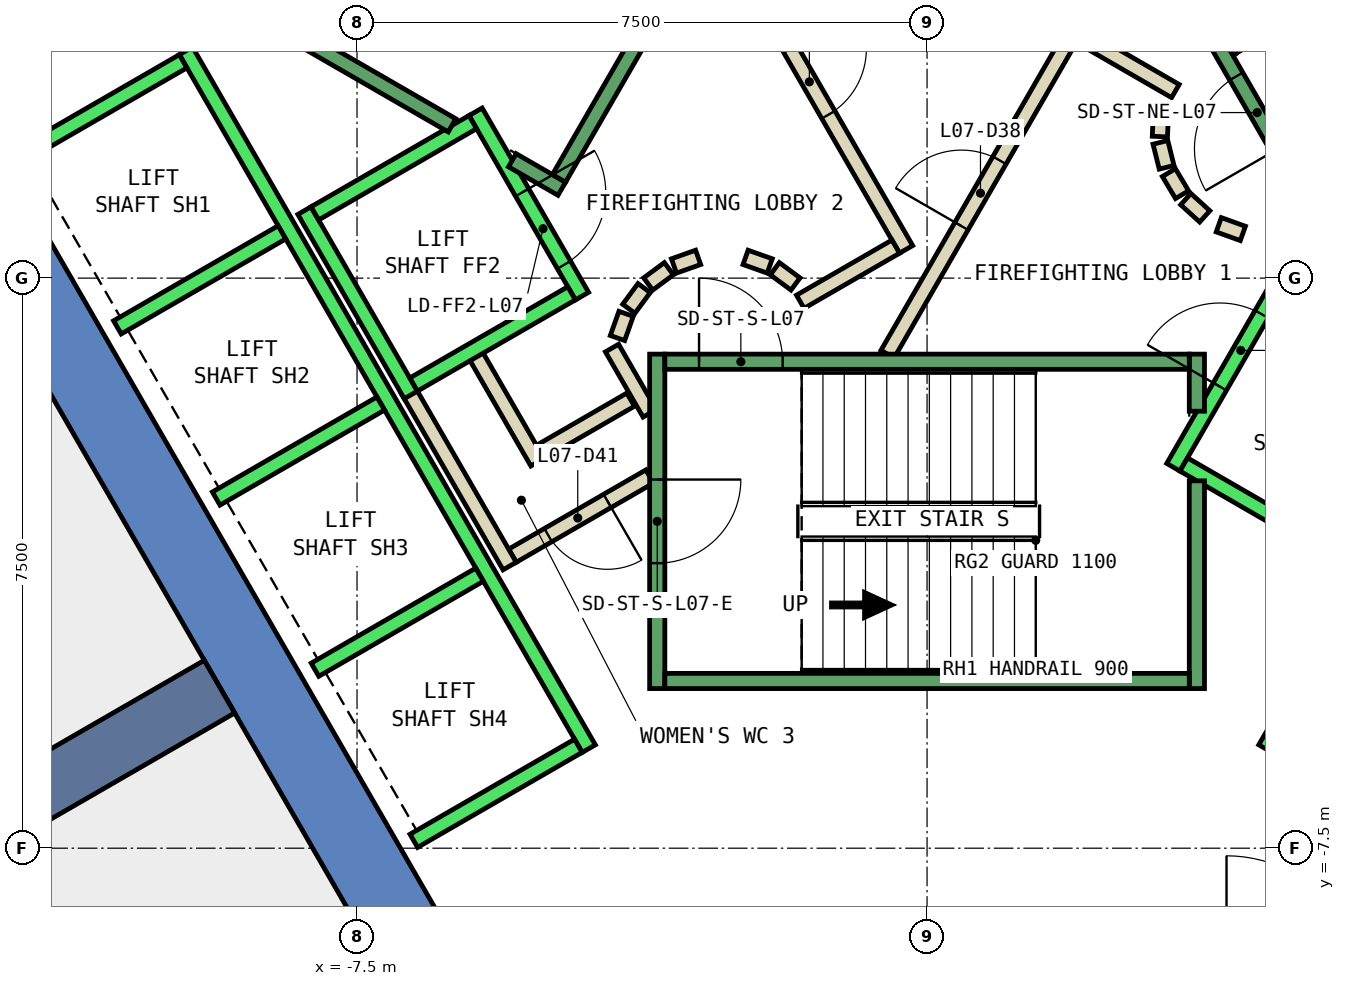
"""IFC4 building model, lengths in metres.
Left out: names, types, materials, properties, quantities, classifications, styles, units other than length and angle.
Written with IfcOpenShell. Run it as: python <this file> out.ifc"""

import sys

from ifc_helpers import new_model, si_unit, direction, frame, frame_2d, origin, place, context, subcontext, project, spatial, polyline, rectangle, outline, extrude, element, fill, save


model = new_model("IFC4")
c1 = context("Model", 3, precision=1e-05, world=origin(), true_north=direction((0.0, 1.0)))
c2 = subcontext(c1, "Body", "Model", "MODEL_VIEW")
j1 = project(units=[si_unit("LENGTHUNIT", "METRE"), si_unit("PLANEANGLEUNIT", "RADIAN")], contexts=[c1])
p1 = place(None, origin())
s1 = spatial("IfcSite", under=j1, at=p1, CompositionType="ELEMENT")
p2 = place(p1, origin())
s2 = spatial("IfcBuilding", under=s1, at=p2, CompositionType="ELEMENT")
p3 = place(p2, frame((0.0, 0.0, 39.2)))
s3 = spatial("IfcBuildingStorey", under=s2, at=p3, CompositionType="ELEMENT", Elevation=39.2)
p4 = place(p3, frame((0.0, 0.0, -0.4)))
e1 = element("IfcWall", 1, at=p4, inside=s3, PredefinedType="SHEAR", context=c2, shape_type="SweptSolid", body=[
    extrude(outline(polyline([(-13.856, 2.5), (-6.928, -9.5), (-6.351, -8.5), (-12.702, 2.5), (-13.856, 2.5)])), origin(), (0.0, 0.0, 1.0), 4.2),
])
p5 = place(p3, frame((-9.31, -5.375, -0.4), z_axis=(0.0, 0.0, 1.0), x_axis=(-0.866017533419, -0.500013631625, 0.0)))
e2 = element("IfcWall", 2, at=p5, inside=s3, PredefinedType="SHEAR", context=c2, shape_type="SweptSolid", body=[
    extrude(rectangle(XDim=9.0, YDim=0.8, at=frame_2d((4.5, 0.0))), origin(), (0.0, 0.0, 1.0), 4.2),
])
p6 = place(p3, frame((-3.9, -1.599, 0.0), z_axis=(0.0, 0.0, 1.0), x_axis=(-0.865969445389, -0.500096910261, 0.0)))
e3 = element("IfcWall", 3, at=p6, inside=s3, PredefinedType="PARTITIONING", context=c2, shape_type="SweptSolid", body=[
    extrude(rectangle(XDim=1.373, YDim=0.2, at=frame_2d((0.687, 0.0))), origin(), (0.0, 0.0, 1.0), 3.8),
])
p7 = place(p3, frame((-5.126, -2.422, 0.0), z_axis=(0.0, 0.0, 1.0), x_axis=(-0.500062241894, 0.865989465428, 0.0)))
e4 = element("IfcWall", 4, at=p7, inside=s3, PredefinedType="PARTITIONING", context=c2, shape_type="SweptSolid", body=[
    extrude(rectangle(XDim=1.7, YDim=0.2, at=frame_2d((0.85, 0.0))), origin(), (0.0, 0.0, 1.0), 3.8),
])
p8 = place(p3, frame((-3.65, -2.61, 0.0), z_axis=(0.0, 0.0, 1.0), x_axis=(-0.866072462134, -0.499918483688, 0.0)))
e5 = element("IfcWall", 5, at=p8, inside=s3, PredefinedType="PARTITIONING", context=c2, shape_type="SweptSolid", body=[
    extrude(rectangle(XDim=2.084, YDim=0.2, at=frame_2d((1.042, 0.0))), origin(), (0.0, 0.0, 1.0), 3.8),
])
p9 = place(p8, frame((0.642, 0.0, 0.0)))
e6 = element("IfcOpeningElement", 6, at=p9, cuts=e5, PredefinedType="OPENING", context=c2, shape_type="SweptSolid", body=[
    extrude(rectangle(XDim=0.9, YDim=2.1, at=frame_2d((0.45, 1.05))), frame((0.0, 0.11, 0.0), z_axis=(0.0, -1.0, 0.0), x_axis=(1.0, 0.0, 0.0)), (0.0, 0.0, 1.0), 0.22),
])
p10 = place(p3, frame((-5.492, -3.788, 0.0), z_axis=(0.0, 0.0, 1.0), x_axis=(-0.500008949224, 0.866020236886, 0.0)))
e7 = element("IfcWall", 7, at=p10, inside=s3, PredefinedType="PARTITIONING", context=c2, shape_type="SweptSolid", body=[
    extrude(rectangle(XDim=2.68, YDim=0.2, at=frame_2d((1.34, 0.0))), origin(), (0.0, 0.0, 1.0), 3.8),
])
p11 = place(p3, frame((-4.145, -0.92, 0.0), z_axis=(0.0, 0.0, 1.0), x_axis=(0.499743786207, -0.866173278362, 0.0)))
e8 = element("IfcWall", 8, at=p11, inside=s3, PredefinedType="PARTITIONING", context=c2, shape_type="SweptSolid", body=[
    extrude(rectangle(XDim=0.991, YDim=0.2, at=frame_2d((0.495, 0.0))), origin(), (0.0, 0.0, 1.0), 3.8),
])
p12 = place(p3, frame((-0.52, -1.0, 0.0), z_axis=(0.0, 0.0, 1.0), x_axis=(0.50011622646, 0.865958290007, 0.0)))
e9 = element("IfcWall", 9, at=p12, inside=s3, PredefinedType="PARTITIONING", context=c2, shape_type="SweptSolid", body=[
    extrude(rectangle(XDim=4.991, YDim=0.2, at=frame_2d((2.496, 0.0))), origin(), (0.0, 0.0, 1.0), 3.8),
])
p13 = place(p12, frame((1.945, 0.0, 0.0)))
e10 = element("IfcOpeningElement", 10, at=p13, cuts=e9, PredefinedType="OPENING", context=c2, shape_type="SweptSolid", body=[
    extrude(rectangle(XDim=1.0, YDim=2.1, at=frame_2d((0.5, 1.05))), frame((0.0, 0.11, 0.0), z_axis=(0.0, -1.0, 0.0), x_axis=(1.0, 0.0, 0.0)), (0.0, 0.0, 1.0), 0.22),
])
p14 = place(p3, frame((2.012, 3.186, 0.0), z_axis=(0.0, 0.0, 1.0), x_axis=(0.865891012941, -0.500232699559, 0.0)))
e11 = element("IfcWall", 11, at=p14, inside=s3, PredefinedType="PARTITIONING", context=c2, shape_type="SweptSolid", body=[
    extrude(rectangle(XDim=1.449, YDim=0.2, at=frame_2d((0.725, 0.0))), origin(), (0.0, 0.0, 1.0), 3.8),
])
p15 = place(p3, frame((3.079, 2.199, 0.0), z_axis=(0.0, 0.0, 1.0), x_axis=(-0.047771483479, -0.998858290933, 0.0)))
e12 = element("IfcWall", 12, at=p15, inside=s3, PredefinedType="PARTITIONING", context=c2, shape_type="SweptSolid", body=[
    extrude(rectangle(XDim=0.337, YDim=0.2, at=frame_2d((0.169, 0.0))), origin(), (0.0, 0.0, 1.0), 3.8),
])
p16 = place(p3, frame((3.07, 1.786, 0.0), z_axis=(0.0, 0.0, 1.0), x_axis=(0.242705583207, -0.970099994784, 0.0)))
e13 = element("IfcWall", 13, at=p16, inside=s3, PredefinedType="PARTITIONING", context=c2, shape_type="SweptSolid", body=[
    extrude(rectangle(XDim=0.338, YDim=0.2, at=frame_2d((0.169, 0.0))), origin(), (0.0, 0.0, 1.0), 3.8),
])
for number, where, z_axis, x_axis in (
    (14, (3.182, 1.388, 0.0), (0.0, 0.0, 1.0), (0.512, -0.859, 0.0)),
    (15, (3.404, 1.039, 0.0), (0.0, 0.0, 1.0), (0.74, -0.672, 0.0)),
):
    element("IfcWall", number, at=place(p3, frame(where, z_axis=z_axis, x_axis=x_axis)), inside=s3, PredefinedType="PARTITIONING", context=c2, shape_type="SweptSolid", body=[
        extrude(rectangle(XDim=0.338, YDim=0.2, at=frame_2d((0.169, 0.0))), origin(), (0.0, 0.0, 1.0), 3.8),
    ])
p17 = place(p3, frame((3.838, 0.702, 0.0), z_axis=(0.0, 0.0, 1.0), x_axis=(0.941035081519, -0.338308993895, 0.0)))
e16 = element("IfcWall", 16, at=p17, inside=s3, PredefinedType="PARTITIONING", context=c2, shape_type="SweptSolid", body=[
    extrude(rectangle(XDim=0.337, YDim=0.2, at=frame_2d((0.168, 0.0))), origin(), (0.0, 0.0, 1.0), 3.8),
])
p18 = place(p3, frame((-2.771, 4.7, 0.0), z_axis=(0.0, 0.0, 1.0), x_axis=(0.499969479948, -0.866043023828, 0.0)))
e17 = element("IfcWall", 17, at=p18, inside=s3, PredefinedType="PARTITIONING", context=c2, shape_type="SweptSolid", body=[
    extrude(rectangle(XDim=4.99, YDim=0.2, at=frame_2d((2.495, 0.0))), origin(), (0.0, 0.0, 1.0), 3.8),
])
p19 = place(p18, frame((1.945, 0.0, 0.0)))
e18 = element("IfcOpeningElement", 18, at=p19, cuts=e17, PredefinedType="OPENING", context=c2, shape_type="SweptSolid", body=[
    extrude(rectangle(XDim=1.0, YDim=2.1, at=frame_2d((0.5, 1.05))), frame((0.0, 0.11, 0.0), z_axis=(0.0, -1.0, 0.0), x_axis=(1.0, 0.0, 0.0)), (0.0, 0.0, 1.0), 0.22),
])
p20 = place(p3, frame((-0.412, 0.414, 0.0), z_axis=(0.0, 0.0, 1.0), x_axis=(-0.866017369001, -0.500013916395, 0.0)))
e19 = element("IfcWall", 19, at=p20, inside=s3, PredefinedType="PARTITIONING", context=c2, shape_type="SweptSolid", body=[
    extrude(rectangle(XDim=1.45, YDim=0.2, at=frame_2d((0.725, 0.0))), origin(), (0.0, 0.0, 1.0), 3.8),
])
p21 = place(p3, frame((-1.731, -0.077, 0.0), z_axis=(0.0, 0.0, 1.0), x_axis=(-0.804311165252, 0.594208338422, 0.0)))
e20 = element("IfcWall", 20, at=p21, inside=s3, PredefinedType="PARTITIONING", context=c2, shape_type="SweptSolid", body=[
    extrude(rectangle(XDim=0.338, YDim=0.2, at=frame_2d((0.169, 0.0))), origin(), (0.0, 0.0, 1.0), 3.8),
])
p22 = place(p3, frame((-2.07, 0.16, 0.0), z_axis=(0.0, 0.0, 1.0), x_axis=(-0.942199461132, 0.335052496547, 0.0)))
e21 = element("IfcWall", 21, at=p22, inside=s3, PredefinedType="PARTITIONING", context=c2, shape_type="SweptSolid", body=[
    extrude(rectangle(XDim=0.337, YDim=0.2, at=frame_2d((0.169, 0.0))), origin(), (0.0, 0.0, 1.0), 3.8),
])
p23 = place(p3, frame((-3.012, 0.273, 0.0), z_axis=(0.0, 0.0, 1.0), x_axis=(-0.942280615813, -0.334824194261, 0.0)))
e22 = element("IfcWall", 22, at=p23, inside=s3, PredefinedType="PARTITIONING", context=c2, shape_type="SweptSolid", body=[
    extrude(rectangle(XDim=0.338, YDim=0.2, at=frame_2d((0.169, 0.0))), origin(), (0.0, 0.0, 1.0), 3.8),
])
p24 = place(p3, frame((-3.397, 0.124, 0.0), z_axis=(0.0, 0.0, 1.0), x_axis=(-0.804311165252, -0.594208338422, 0.0)))
e23 = element("IfcWall", 23, at=p24, inside=s3, PredefinedType="PARTITIONING", context=c2, shape_type="SweptSolid", body=[
    extrude(rectangle(XDim=0.338, YDim=0.2, at=frame_2d((0.169, 0.0))), origin(), (0.0, 0.0, 1.0), 3.8),
])
p25 = place(p3, frame((-3.723, -0.131, 0.0), z_axis=(0.0, 0.0, 1.0), x_axis=(-0.594675113454, -0.803966112121, 0.0)))
e24 = element("IfcWall", 24, at=p25, inside=s3, PredefinedType="PARTITIONING", context=c2, shape_type="SweptSolid", body=[
    extrude(rectangle(XDim=0.338, YDim=0.2, at=frame_2d((0.169, 0.0))), origin(), (0.0, 0.0, 1.0), 3.8),
])
p26 = place(p3, frame((-3.96, -0.47, 0.0), z_axis=(0.0, 0.0, 1.0), x_axis=(-0.334824194261, -0.942280615813, 0.0)))
e25 = element("IfcWall", 25, at=p26, inside=s3, PredefinedType="PARTITIONING", context=c2, shape_type="SweptSolid", body=[
    extrude(rectangle(XDim=0.338, YDim=0.2, at=frame_2d((0.169, 0.0))), origin(), (0.0, 0.0, 1.0), 3.8),
])
p27 = place(p3, frame((-5.94, 2.188, 0.0), z_axis=(0.0, 0.0, 1.0), x_axis=(0.49994636267, -0.866056369097, 0.0)))
e26 = element("IfcWall", 26, at=p27, inside=s3, PredefinedType="STANDARD", context=c2, shape_type="SweptSolid", body=[
    extrude(rectangle(XDim=2.8, YDim=0.2, at=frame_2d((1.4, 0.0))), origin(), (0.0, 0.0, 1.0), 3.8),
])
p28 = place(p27, frame((1.225, 0.0, 0.0)))
e27 = element("IfcOpeningElement", 27, at=p28, cuts=e26, PredefinedType="OPENING", context=c2, shape_type="SweptSolid", body=[
    extrude(rectangle(XDim=1.1, YDim=2.1, at=frame_2d((0.55, 1.05))), frame((0.0, 0.11, 0.0), z_axis=(0.0, -1.0, 0.0), x_axis=(1.0, 0.0, 0.0)), (0.0, 0.0, 1.0), 0.22),
])
p29 = place(p3, frame((-8.192, 0.888, 0.0), z_axis=(0.0, 0.0, 1.0), x_axis=(0.49994636267, -0.866056369097, 0.0)))
e28 = element("IfcWall", 28, at=p29, inside=s3, PredefinedType="STANDARD", context=c2, shape_type="SweptSolid", body=[
    extrude(rectangle(XDim=2.8, YDim=0.2, at=frame_2d((1.4, 0.0))), origin(), (0.0, 0.0, 1.0), 3.8),
])
for number, where, z_axis, x_axis in (
    (29, (-5.977, 2.052, 0.0), (0.0, 0.0, 1.0), (-0.866, -0.5, 0.0)),
    (30, (-4.677, -0.2, 0.0), (0.0, 0.0, 1.0), (-0.866, -0.5, 0.0)),
):
    element("IfcWall", number, at=place(p3, frame(where, z_axis=z_axis, x_axis=x_axis)), inside=s3, PredefinedType="STANDARD", context=c2, shape_type="SweptSolid", body=[
        extrude(rectangle(XDim=2.399, YDim=0.2, at=frame_2d((1.2, 0.0))), origin(), (0.0, 0.0, 1.0), 3.8),
    ])
p30 = place(p3, frame((-9.751, 2.99, 0.0), z_axis=(0.0, 0.0, 1.0), x_axis=(0.50000090737, -0.866024879913, 0.0)))
e31 = element("IfcWall", 31, at=p30, inside=s3, PredefinedType="STANDARD", context=c2, shape_type="SweptSolid", body=[
    extrude(rectangle(XDim=10.6, YDim=0.2, at=frame_2d((5.3, 0.0))), origin(), (0.0, 0.0, 1.0), 3.8),
])
p31 = place(p3, frame((-9.788, 2.853, 0.0), z_axis=(0.0, 0.0, 1.0), x_axis=(-0.865998541277, -0.500046524342, 0.0)))
e32 = element("IfcWall", 32, at=p31, inside=s3, PredefinedType="STANDARD", context=c2, shape_type="SweptSolid", body=[
    extrude(rectangle(XDim=2.5, YDim=0.2, at=frame_2d((1.25, 0.0))), origin(), (0.0, 0.0, 1.0), 3.8),
])
for number, where, z_axis, x_axis in (
    (33, (-8.488, 0.602, 0.0), (0.0, 0.0, 1.0), (-0.866, -0.5, 0.0)),
    (34, (-7.188, -1.65, 0.0), (0.0, 0.0, 1.0), (-0.866, -0.5, 0.0)),
    (35, (-5.888, -3.902, 0.0), (0.0, 0.0, 1.0), (-0.866, -0.5, 0.0)),
    (36, (-4.588, -6.153, 0.0), (0.0, 0.0, 1.0), (-0.866, -0.5, 0.0)),
):
    element("IfcWall", number, at=place(p3, frame(where, z_axis=z_axis, x_axis=x_axis)), inside=s3, PredefinedType="STANDARD", context=c2, shape_type="SweptSolid", body=[
        extrude(rectangle(XDim=2.5, YDim=0.2, at=frame_2d((1.25, 0.0))), origin(), (0.0, 0.0, 1.0), 3.8),
    ])
p32 = place(p3, frame((3.24, -2.488, 0.0), z_axis=(0.0, 0.0, 1.0), x_axis=(0.49994636267, 0.866056369097, 0.0)))
e37 = element("IfcWall", 37, at=p32, inside=s3, PredefinedType="STANDARD", context=c2, shape_type="SweptSolid", body=[
    extrude(rectangle(XDim=2.8, YDim=0.2, at=frame_2d((1.4, 0.0))), origin(), (0.0, 0.0, 1.0), 3.8),
])
p33 = place(p32, frame((1.225, 0.0, 0.0)))
e38 = element("IfcOpeningElement", 38, at=p33, cuts=e37, PredefinedType="OPENING", context=c2, shape_type="SweptSolid", body=[
    extrude(rectangle(XDim=1.1, YDim=2.1, at=frame_2d((0.55, 1.05))), frame((0.0, 0.11, 0.0), z_axis=(0.0, -1.0, 0.0), x_axis=(1.0, 0.0, 0.0)), (0.0, 0.0, 1.0), 0.22),
])
p34 = place(p3, frame((3.377, -2.452, 0.0), z_axis=(0.0, 0.0, 1.0), x_axis=(0.865955154139, -0.50012165622, 0.0)))
e39 = element("IfcWall", 39, at=p34, inside=s3, PredefinedType="STANDARD", context=c2, shape_type="SweptSolid", body=[
    extrude(rectangle(XDim=2.4, YDim=0.2, at=frame_2d((1.2, 0.0))), origin(), (0.0, 0.0, 1.0), 3.8),
])
p35 = place(p3, frame((4.451, -6.19, 0.0), z_axis=(0.0, 0.0, 1.0), x_axis=(0.50000090737, 0.866024879913, 0.0)))
e40 = element("IfcWall", 40, at=p35, inside=s3, PredefinedType="STANDARD", context=c2, shape_type="SweptSolid", body=[
    extrude(rectangle(XDim=10.6, YDim=0.2, at=frame_2d((5.3, 0.0))), origin(), (0.0, 0.0, 1.0), 3.8),
])
p36 = place(p3, frame((-3.55, -1.0, 0.0), z_axis=(0.0, 0.0, 1.0), x_axis=(0.0, -1.0, 0.0)))
e41 = element("IfcWall", 41, at=p36, inside=s3, PredefinedType="STANDARD", context=c2, shape_type="SweptSolid", body=[
    extrude(rectangle(XDim=4.4, YDim=0.2, at=frame_2d((2.2, 0.0))), origin(), (0.0, 0.0, 1.0), 3.8),
])
p37 = place(p36, frame((1.65, 0.0, 0.0)))
e42 = element("IfcOpeningElement", 42, at=p37, cuts=e41, PredefinedType="OPENING", context=c2, shape_type="SweptSolid", body=[
    extrude(rectangle(XDim=1.1, YDim=2.2, at=frame_2d((0.55, 1.1))), frame((0.0, 0.11, 0.0), z_axis=(0.0, -1.0, 0.0), x_axis=(1.0, 0.0, 0.0)), (0.0, 0.0, 1.0), 0.22),
])
p38 = place(p3, frame((3.55, -2.667, 0.0), z_axis=(0.0, 0.0, 1.0), x_axis=(0.0, -1.0, 0.0)))
e43 = element("IfcWall", 43, at=p38, inside=s3, PredefinedType="STANDARD", context=c2, shape_type="SweptSolid", body=[
    extrude(rectangle(XDim=2.733, YDim=0.2, at=frame_2d((1.366, 0.0))), origin(), (0.0, 0.0, 1.0), 3.8),
])
p39 = place(p3, frame((3.55, -1.0, 0.0), z_axis=(0.0, 0.0, 1.0), x_axis=(0.0, -1.0, 0.0)))
e44 = element("IfcWall", 44, at=p39, inside=s3, PredefinedType="STANDARD", context=c2, shape_type="SweptSolid", body=[
    extrude(rectangle(XDim=0.751, YDim=0.2, at=frame_2d((0.375, 0.0))), origin(), (0.0, 0.0, 1.0), 3.8),
])
p40 = place(p3, frame((-3.45, -1.1, 0.0), z_axis=(0.0, 0.0, 1.0), x_axis=(1.0, 0.0, 0.0)))
e45 = element("IfcWall", 45, at=p40, inside=s3, PredefinedType="STANDARD", context=c2, shape_type="SweptSolid", body=[
    extrude(rectangle(XDim=6.9, YDim=0.2, at=frame_2d((3.45, 0.0))), origin(), (0.0, 0.0, 1.0), 3.8),
])
p41 = place(p40, frame((0.45, 0.0, 0.0)))
e46 = element("IfcOpeningElement", 46, at=p41, cuts=e45, PredefinedType="OPENING", context=c2, shape_type="SweptSolid", body=[
    extrude(rectangle(XDim=1.1, YDim=2.2, at=frame_2d((0.55, 1.1))), frame((0.0, 0.11, 0.0), z_axis=(0.0, -1.0, 0.0), x_axis=(1.0, 0.0, 0.0)), (0.0, 0.0, 1.0), 0.22),
])
p42 = place(p3, frame((-3.45, -5.3, 0.0), z_axis=(0.0, 0.0, 1.0), x_axis=(1.0, 0.0, 0.0)))
e47 = element("IfcWall", 47, at=p42, inside=s3, PredefinedType="STANDARD", context=c2, shape_type="SweptSolid", body=[
    extrude(rectangle(XDim=6.9, YDim=0.2, at=frame_2d((3.45, 0.0))), origin(), (0.0, 0.0, 1.0), 3.8),
])
p43 = place(p3, frame((4.843, 1.312, 0.0), z_axis=(0.0, 0.0, 1.0), x_axis=(-0.499963383562, 0.866046543262, 0.0)))
e48 = element("IfcWall", 48, at=p43, inside=s3, PredefinedType="STANDARD", context=c2, shape_type="SweptSolid", body=[
    extrude(rectangle(XDim=6.9, YDim=0.2, at=frame_2d((3.45, 0.0))), origin(), (0.0, 0.0, 1.0), 3.8),
])
p44 = place(p43, frame((0.45, 0.0, 0.0)))
e49 = element("IfcOpeningElement", 49, at=p44, cuts=e48, PredefinedType="OPENING", context=c2, shape_type="SweptSolid", body=[
    extrude(rectangle(XDim=1.1, YDim=2.2, at=frame_2d((0.55, 1.1))), frame((0.0, 0.11, 0.0), z_axis=(0.0, -1.0, 0.0), x_axis=(1.0, 0.0, 0.0)), (0.0, 0.0, 1.0), 0.22),
])
p45 = place(p3, frame((-6.25, 2.01, 0.0), z_axis=(0.0, 0.0, 1.0), x_axis=(-0.86611865017, 0.499838457731, 0.0)))
e50 = element("IfcWall", 50, at=p45, inside=s3, PredefinedType="STANDARD", context=c2, shape_type="SweptSolid", body=[
    extrude(rectangle(XDim=2.733, YDim=0.2, at=frame_2d((1.366, 0.0))), origin(), (0.0, 0.0, 1.0), 3.8),
])
p46 = place(p3, frame((-4.806, 1.176, 0.0), z_axis=(0.0, 0.0, 1.0), x_axis=(-0.866558586415, 0.499075361355, 0.0)))
e51 = element("IfcWall", 51, at=p46, inside=s3, PredefinedType="STANDARD", context=c2, shape_type="SweptSolid", body=[
    extrude(rectangle(XDim=0.751, YDim=0.2, at=frame_2d((0.376, 0.0))), origin(), (0.0, 0.0, 1.0), 3.8),
])
p47 = place(p3, frame((-1.393, 7.288, 0.0), z_axis=(0.0, 0.0, 1.0), x_axis=(-0.499963383562, -0.866046543262, 0.0)))
e52 = element("IfcWall", 52, at=p47, inside=s3, PredefinedType="STANDARD", context=c2, shape_type="SweptSolid", body=[
    extrude(rectangle(XDim=6.9, YDim=0.2, at=frame_2d((3.45, 0.0))), origin(), (0.0, 0.0, 1.0), 3.8),
])
p48 = place(p47, frame((0.45, 0.0, 0.0)))
e53 = element("IfcOpeningElement", 53, at=p48, cuts=e52, PredefinedType="OPENING", context=c2, shape_type="SweptSolid", body=[
    extrude(rectangle(XDim=1.1, YDim=2.2, at=frame_2d((0.55, 1.1))), frame((0.0, 0.11, 0.0), z_axis=(0.0, -1.0, 0.0), x_axis=(1.0, 0.0, 0.0)), (0.0, 0.0, 1.0), 0.22),
])
p49 = place(p13, origin())
e54 = element("IfcDoor", 54, at=p49, inside=s3, OperationType="SINGLE_SWING_LEFT", PredefinedType="DOOR", context=c2, shape_type="SweptSolid", body=[
    extrude(rectangle(XDim=1.0, YDim=2.1, at=frame_2d((0.5, 1.05))), frame((0.0, 0.025, 0.0), z_axis=(0.0, -1.0, 0.0), x_axis=(1.0, 0.0, 0.0)), (0.0, 0.0, 1.0), 0.05),
])
fill(e10, e54)
p50 = place(p19, origin())
e55 = element("IfcDoor", 55, at=p50, inside=s3, OperationType="SINGLE_SWING_RIGHT", PredefinedType="DOOR", context=c2, shape_type="SweptSolid", body=[
    extrude(rectangle(XDim=1.0, YDim=2.1, at=frame_2d((0.5, 1.05))), frame((0.0, 0.025, 0.0), z_axis=(0.0, -1.0, 0.0), x_axis=(1.0, 0.0, 0.0)), (0.0, 0.0, 1.0), 0.05),
])
fill(e18, e55)
p51 = place(p9, origin())
e56 = element("IfcDoor", 56, at=p51, inside=s3, OperationType="SINGLE_SWING_LEFT", PredefinedType="DOOR", context=c2, shape_type="SweptSolid", body=[
    extrude(rectangle(XDim=0.9, YDim=2.1, at=frame_2d((0.45, 1.05))), frame((0.0, 0.025, 0.0), z_axis=(0.0, -1.0, 0.0), x_axis=(1.0, 0.0, 0.0)), (0.0, 0.0, 1.0), 0.05),
])
fill(e6, e56)
p52 = place(p33, origin())
e57 = element("IfcDoor", 57, at=p52, inside=s3, OperationType="SLIDING_TO_LEFT", PredefinedType="DOOR", context=c2, shape_type="SweptSolid", body=[
    extrude(rectangle(XDim=1.1, YDim=2.1, at=frame_2d((0.55, 1.05))), frame((0.0, 0.025, 0.0), z_axis=(0.0, -1.0, 0.0), x_axis=(1.0, 0.0, 0.0)), (0.0, 0.0, 1.0), 0.05),
])
fill(e38, e57)
p53 = place(p28, origin())
e58 = element("IfcDoor", 58, at=p53, inside=s3, OperationType="SLIDING_TO_LEFT", PredefinedType="DOOR", context=c2, shape_type="SweptSolid", body=[
    extrude(rectangle(XDim=1.1, YDim=2.1, at=frame_2d((0.55, 1.05))), frame((0.0, 0.025, 0.0), z_axis=(0.0, -1.0, 0.0), x_axis=(1.0, 0.0, 0.0)), (0.0, 0.0, 1.0), 0.05),
])
fill(e27, e58)
p54 = place(p41, origin())
e59 = element("IfcDoor", 59, at=p54, inside=s3, OperationType="SINGLE_SWING_LEFT", PredefinedType="DOOR", context=c2, shape_type="SweptSolid", body=[
    extrude(rectangle(XDim=1.1, YDim=2.2, at=frame_2d((0.55, 1.1))), frame((0.0, 0.025, 0.0), z_axis=(0.0, -1.0, 0.0), x_axis=(1.0, 0.0, 0.0)), (0.0, 0.0, 1.0), 0.05),
])
fill(e46, e59)
p55 = place(p37, origin())
e60 = element("IfcDoor", 60, at=p55, inside=s3, OperationType="SINGLE_SWING_LEFT", PredefinedType="DOOR", context=c2, shape_type="SweptSolid", body=[
    extrude(rectangle(XDim=1.1, YDim=2.2, at=frame_2d((0.55, 1.1))), frame((0.0, 0.025, 0.0), z_axis=(0.0, -1.0, 0.0), x_axis=(1.0, 0.0, 0.0)), (0.0, 0.0, 1.0), 0.05),
])
fill(e42, e60)
p56 = place(p44, origin())
e61 = element("IfcDoor", 61, at=p56, inside=s3, OperationType="SINGLE_SWING_LEFT", PredefinedType="DOOR", context=c2, shape_type="SweptSolid", body=[
    extrude(rectangle(XDim=1.1, YDim=2.2, at=frame_2d((0.55, 1.1))), frame((0.0, 0.025, 0.0), z_axis=(0.0, -1.0, 0.0), x_axis=(1.0, 0.0, 0.0)), (0.0, 0.0, 1.0), 0.05),
])
fill(e49, e61)
save(model, sys.argv[1])
